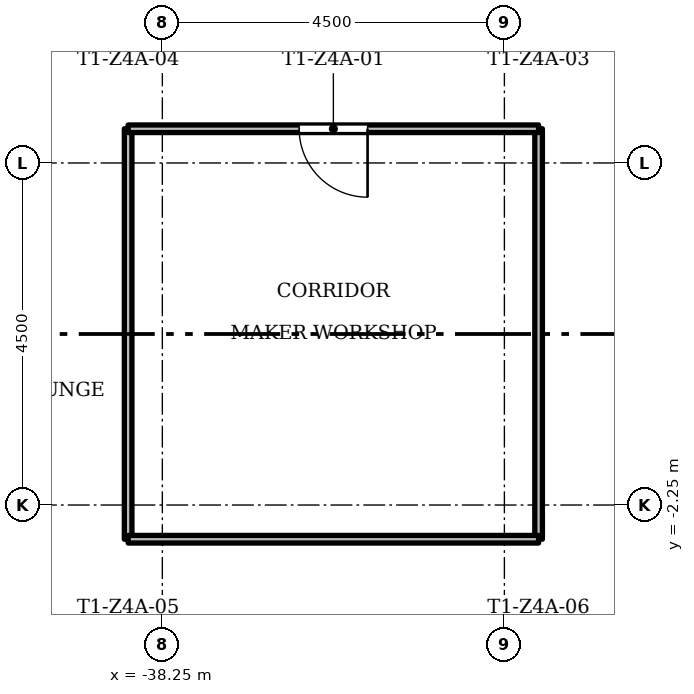
"""IFC4 building model, lengths in metres.
Left out: names, types, materials, properties, quantities, classifications, styles, units other than length and angle.
Written with IfcOpenShell. Run it as: python <this file> out.ifc"""

import sys

from ifc_helpers import new_model, si_unit, direction, frame, frame_2d, origin, place, context, subcontext, project, spatial, rectangle, extrude, element, fill, save


model = new_model("IFC4")
c1 = context("Model", 3, precision=1e-05, world=origin(), true_north=direction((0.0, 1.0)))
c2 = subcontext(c1, "Body", "Model", "MODEL_VIEW")
j1 = project(units=[si_unit("LENGTHUNIT", "METRE"), si_unit("PLANEANGLEUNIT", "RADIAN")], contexts=[c1])
p1 = place(None, origin())
s1 = spatial("IfcSite", under=j1, at=p1, CompositionType="ELEMENT")
p2 = place(p1, origin())
s2 = spatial("IfcBuilding", under=s1, at=p2, CompositionType="ELEMENT")
p3 = place(p2, frame((0.0, 0.0, 226.6)))
s3 = spatial("IfcBuildingStorey", under=s2, at=p3, CompositionType="ELEMENT", Elevation=226.6)
for number, where, z_axis, x_axis in (
    (1, (-38.7, -2.7, 0.0), (0.0, 0.0, 1.0), (0.0, 1.0, 0.0)),
    (2, (-33.3, -2.7, 0.0), (0.0, 0.0, 1.0), (0.0, 1.0, 0.0)),
    (3, (-38.7, -2.7, 0.0), (0.0, 0.0, 1.0), (1.0, 0.0, 0.0)),
):
    element("IfcWall", number, at=place(p3, frame(where, z_axis=z_axis, x_axis=x_axis)), inside=s3, PredefinedType="PARTITIONING", context=c2, shape_type="SweptSolid", body=[
        extrude(rectangle(XDim=5.4, YDim=0.1, at=frame_2d((2.7, 0.0))), origin(), (0.0, 0.0, 1.0), 3.0),
    ])
p4 = place(p3, frame((-38.7, 2.7, 0.0), z_axis=(0.0, 0.0, 1.0), x_axis=(1.0, 0.0, 0.0)))
e4 = element("IfcWall", 4, at=p4, inside=s3, PredefinedType="PARTITIONING", context=c2, shape_type="SweptSolid", body=[
    extrude(rectangle(XDim=5.4, YDim=0.1, at=frame_2d((2.7, 0.0))), origin(), (0.0, 0.0, 1.0), 3.0),
])
p5 = place(p4, frame((2.25, 0.0, 0.0)))
e5 = element("IfcOpeningElement", 5, at=p5, cuts=e4, PredefinedType="OPENING", context=c2, shape_type="SweptSolid", body=[
    extrude(rectangle(XDim=0.9, YDim=2.1, at=frame_2d((0.45, 1.05))), frame((0.0, 0.06, 0.0), z_axis=(0.0, -1.0, 0.0), x_axis=(1.0, 0.0, 0.0)), (0.0, 0.0, 1.0), 0.12),
])
p6 = place(p5, origin())
e6 = element("IfcDoor", 6, at=p6, inside=s3, OperationType="SINGLE_SWING_RIGHT", PredefinedType="DOOR", context=c2, shape_type="SweptSolid", body=[
    extrude(rectangle(XDim=0.9, YDim=2.1, at=frame_2d((0.45, 1.05))), frame((0.0, 0.025, 0.0), z_axis=(0.0, -1.0, 0.0), x_axis=(1.0, 0.0, 0.0)), (0.0, 0.0, 1.0), 0.05),
])
fill(e5, e6)
save(model, sys.argv[1])
